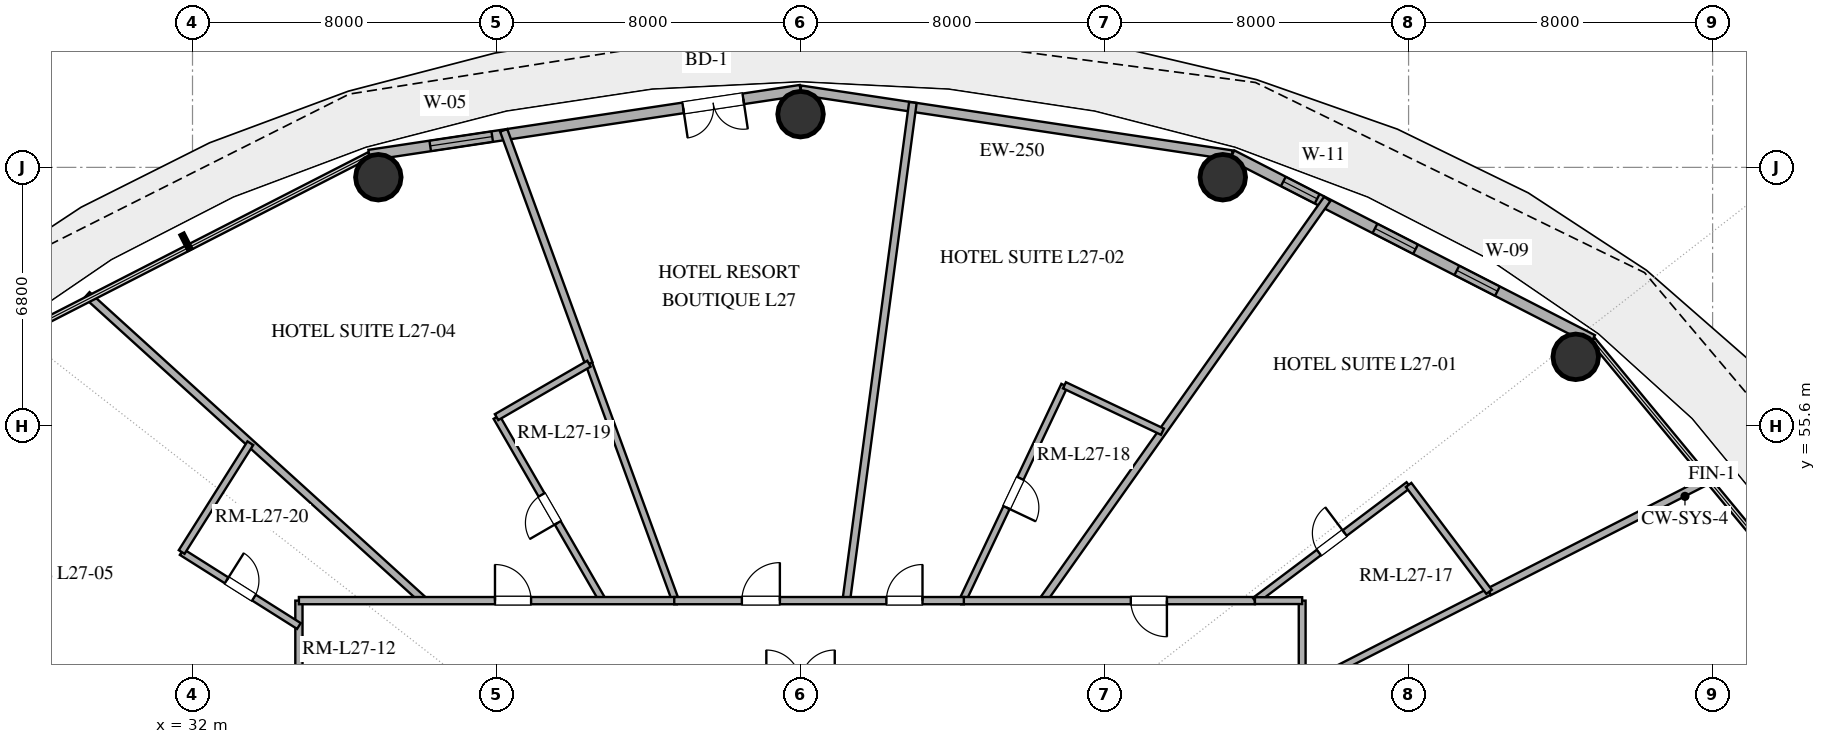
"""IFC4 building model, lengths in metres.
Left out: names, types, materials, properties, quantities, classifications, styles, units other than length and angle.
Written with IfcOpenShell. Run it as: python <this file> out.ifc"""

import sys

from ifc_helpers import new_model, si_unit, direction, frame, frame_2d, origin, origin_2d, place, context, subcontext, project, spatial, rectangle, hollow_circle, extrude, element, fill, save


model = new_model("IFC4")
c1 = context("Model", 3, precision=1e-05, world=origin(), true_north=direction((0.0, 1.0)))
c2 = subcontext(c1, "Body", "Model", "MODEL_VIEW")
j1 = project(units=[si_unit("LENGTHUNIT", "METRE"), si_unit("PLANEANGLEUNIT", "RADIAN")], contexts=[c1])
p1 = place(None, origin())
s1 = spatial("IfcSite", under=j1, at=p1, CompositionType="ELEMENT")
p2 = place(p1, origin())
s2 = spatial("IfcBuilding", under=s1, at=p2, CompositionType="ELEMENT")
p3 = place(p2, frame((0.0, 0.0, 109.2)))
s3 = spatial("IfcBuildingStorey", under=s2, at=p3, CompositionType="ELEMENT", Elevation=109.2)
for number, where, z_axis, x_axis in (
    (1, (68.398, 57.415, 0.0), (0.0, 0.0, 1.0), (1.0, 0.0, 0.0)),
    (2, (59.11, 62.141, 0.0), (0.0, 0.0, 1.0), (1.0, 0.0, 0.0)),
    (3, (48.0, 63.8, 0.0), (0.0, 0.0, 1.0), (1.0, 0.0, 0.0)),
    (4, (36.89, 62.141, 0.0), (0.0, 0.0, 1.0), (1.0, 0.0, 0.0)),
):
    element("IfcColumn", number, at=place(p3, frame(where, z_axis=z_axis, x_axis=x_axis)), inside=s3, PredefinedType="COLUMN", context=c2, shape_type="SweptSolid", body=[
        extrude(hollow_circle(Radius=0.6, WallThickness=0.032, at=origin_2d()), origin(), (0.0, 0.0, 1.0), 3.38),
    ])
p4 = place(p3, frame((68.84, 57.86, 0.0), z_axis=(0.0, 0.0, 1.0), x_axis=(-0.889959505023, 0.45603955905, 0.0)))
e5 = element("IfcWall", 5, at=p4, inside=s3, PredefinedType="SOLIDWALL", context=c2, shape_type="SweptSolid", body=[
    extrude(rectangle(XDim=10.662, YDim=0.28, at=frame_2d((5.331, 0.0))), origin(), (0.0, 0.0, 1.0), 3.38),
])
p5 = place(p4, frame((2.811, 0.0, 0.85)))
e6 = element("IfcOpeningElement", 6, at=p5, cuts=e5, PredefinedType="OPENING", context=c2, shape_type="SweptSolid", body=[
    extrude(rectangle(XDim=1.2, YDim=1.8, at=frame_2d((0.6, 0.9))), frame((0.0, 0.15, 0.0), z_axis=(0.0, -1.0, 0.0), x_axis=(1.0, 0.0, 0.0)), (0.0, 0.0, 1.0), 0.3),
])
p6 = place(p4, frame((5.232, 0.0, 0.85)))
e7 = element("IfcOpeningElement", 7, at=p6, cuts=e5, PredefinedType="OPENING", context=c2, shape_type="SweptSolid", body=[
    extrude(rectangle(XDim=1.2, YDim=1.8, at=frame_2d((0.6, 0.9))), frame((0.0, 0.15, 0.0), z_axis=(0.0, -1.0, 0.0), x_axis=(1.0, 0.0, 0.0)), (0.0, 0.0, 1.0), 0.3),
])
p7 = place(p4, frame((8.142, 0.0, 0.85)))
e8 = element("IfcOpeningElement", 8, at=p7, cuts=e5, PredefinedType="OPENING", context=c2, shape_type="SweptSolid", body=[
    extrude(rectangle(XDim=1.0, YDim=1.8, at=frame_2d((0.5, 0.9))), frame((0.0, 0.15, 0.0), z_axis=(0.0, -1.0, 0.0), x_axis=(1.0, 0.0, 0.0)), (0.0, 0.0, 1.0), 0.3),
])
p8 = place(p3, frame((59.351, 62.723, 0.0), z_axis=(0.0, 0.0, 1.0), x_axis=(-0.988877774656, 0.148730450117, 0.0)))
e9 = element("IfcWall", 9, at=p8, inside=s3, PredefinedType="SOLIDWALL", context=c2, shape_type="SweptSolid", body=[
    extrude(rectangle(XDim=11.479, YDim=0.25, at=frame_2d((5.74, 0.0))), origin(), (0.0, 0.0, 1.0), 3.38),
])
p9 = place(p3, frame((48.0, 64.43, 0.0), z_axis=(0.0, 0.0, 1.0), x_axis=(-0.988877774656, -0.148730450117, 0.0)))
e10 = element("IfcWall", 10, at=p9, inside=s3, PredefinedType="SOLIDWALL", context=c2, shape_type="SweptSolid", body=[
    extrude(rectangle(XDim=11.479, YDim=0.28, at=frame_2d((5.74, 0.0))), origin(), (0.0, 0.0, 1.0), 3.38),
])
p10 = place(p9, frame((1.524, 0.0, 0.0)))
e11 = element("IfcOpeningElement", 11, at=p10, cuts=e10, PredefinedType="OPENING", context=c2, shape_type="SweptSolid", body=[
    extrude(rectangle(XDim=1.6, YDim=2.25, at=frame_2d((0.8, 1.125))), frame((0.0, 0.15, 0.0), z_axis=(0.0, -1.0, 0.0), x_axis=(1.0, 0.0, 0.0)), (0.0, 0.0, 1.0), 0.3),
])
p11 = place(p9, frame((8.205, 0.0, 0.85)))
e12 = element("IfcOpeningElement", 12, at=p11, cuts=e10, PredefinedType="OPENING", context=c2, shape_type="SweptSolid", body=[
    extrude(rectangle(XDim=1.65, YDim=2.0, at=frame_2d((0.825, 1.0))), frame((0.0, 0.15, 0.0), z_axis=(0.0, -1.0, 0.0), x_axis=(1.0, 0.0, 0.0)), (0.0, 0.0, 1.0), 0.3),
])
p12 = place(p3, frame((50.956, 64.107, 0.0), z_axis=(0.0, 0.0, 1.0), x_axis=(-0.132526518831, -0.99117945994, 0.0)))
e13 = element("IfcWall", 13, at=p12, inside=s3, PredefinedType="PARTITIONING", context=c2, shape_type="SweptSolid", body=[
    extrude(rectangle(XDim=13.223, YDim=0.2, at=frame_2d((6.612, 0.0))), origin(), (0.0, 0.0, 1.0), 2.74),
])
p13 = place(p3, frame((54.374, 51.0, 0.0), z_axis=(0.0, 0.0, 1.0), x_axis=(0.577967135411, 0.816060040919, 0.0)))
e14 = element("IfcWall", 14, at=p13, inside=s3, PredefinedType="PARTITIONING", context=c2, shape_type="SweptSolid", body=[
    extrude(rectangle(XDim=12.953, YDim=0.2, at=frame_2d((6.477, 0.0))), origin(), (0.0, 0.0, 1.0), 2.74),
])
p14 = place(p3, frame((42.432, 57.234, 0.0), z_axis=(0.0, 0.0, 1.0), x_axis=(0.343307767445, -0.939222964376, 0.0)))
e15 = element("IfcWall", 15, at=p14, inside=s3, PredefinedType="PLUMBINGWALL", context=c2, shape_type="SweptSolid", body=[
    extrude(rectangle(XDim=6.638, YDim=0.18, at=frame_2d((3.319, 0.0))), origin(), (0.0, 0.0, 1.0), 2.74),
])
p15 = place(p3, frame((71.998, 54.228, 0.0), z_axis=(0.0, 0.0, 1.0), x_axis=(-0.891005333778, -0.453992836044, 0.0)))
e16 = element("IfcWall", 16, at=p15, inside=s3, PredefinedType="PARTITIONING", context=c2, shape_type="SweptSolid", body=[
    extrude(rectangle(XDim=6.599, YDim=0.2, at=frame_2d((3.3, 0.0))), origin(), (0.0, 0.0, 1.0), 2.74),
])
p16 = place(p3, frame((34.8, 36.329, 0.0), z_axis=(0.0, 0.0, 1.0), x_axis=(0.0, 1.0, 0.0)))
e17 = element("IfcWall", 17, at=p16, inside=s3, PredefinedType="PARTITIONING", context=c2, shape_type="SweptSolid", body=[
    extrude(rectangle(XDim=14.671, YDim=0.19, at=frame_2d((7.336, 0.0))), origin(), (0.0, 0.0, 1.0), 2.74),
])
p17 = place(p16, frame((5.341, 0.0, 0.0)))
e18 = element("IfcOpeningElement", 18, at=p17, cuts=e17, PredefinedType="OPENING", context=c2, shape_type="SweptSolid", body=[
    extrude(rectangle(XDim=1.0, YDim=2.2, at=frame_2d((0.5, 1.1))), frame((0.0, 0.105, 0.0), z_axis=(0.0, -1.0, 0.0), x_axis=(1.0, 0.0, 0.0)), (0.0, 0.0, 1.0), 0.21),
])
p18 = place(p16, frame((11.076, 0.0, 0.0)))
e19 = element("IfcOpeningElement", 19, at=p18, cuts=e17, PredefinedType="OPENING", context=c2, shape_type="SweptSolid", body=[
    extrude(rectangle(XDim=0.95, YDim=2.15, at=frame_2d((0.475, 1.075))), frame((0.0, 0.105, 0.0), z_axis=(0.0, -1.0, 0.0), x_axis=(1.0, 0.0, 0.0)), (0.0, 0.0, 1.0), 0.21),
])
p19 = place(p3, frame((40.188, 63.374, 0.0), z_axis=(0.0, 0.0, 1.0), x_axis=(0.343281030887, -0.939232736777, 0.0)))
e20 = element("IfcWall", 20, at=p19, inside=s3, PredefinedType="PARTITIONING", context=c2, shape_type="SweptSolid", body=[
    extrude(rectangle(XDim=6.537, YDim=0.2, at=frame_2d((3.268, 0.0))), origin(), (0.0, 0.0, 1.0), 2.74),
])
p20 = place(p3, frame((54.945, 56.666, 0.0), z_axis=(0.0, 0.0, 1.0), x_axis=(-0.427935680108, -0.903809190975, 0.0)))
e21 = element("IfcWall", 21, at=p20, inside=s3, PredefinedType="PLUMBINGWALL", context=c2, shape_type="SweptSolid", body=[
    extrude(rectangle(XDim=6.269, YDim=0.18, at=frame_2d((3.135, 0.0))), origin(), (0.0, 0.0, 1.0), 2.74),
])
p21 = place(p20, frame((2.71, 0.0, 0.0)))
e22 = element("IfcOpeningElement", 22, at=p21, cuts=e21, PredefinedType="OPENING", context=c2, shape_type="SweptSolid", body=[
    extrude(rectangle(XDim=0.85, YDim=2.1, at=frame_2d((0.425, 1.05))), frame((0.0, 0.1, 0.0), z_axis=(0.0, -1.0, 0.0), x_axis=(1.0, 0.0, 0.0)), (0.0, 0.0, 1.0), 0.2),
])
p22 = place(p3, frame((38.085, 51.0, 0.0), z_axis=(0.0, 0.0, 1.0), x_axis=(-0.74043922717, 0.672123315224, 0.0)))
e23 = element("IfcWall", 23, at=p22, inside=s3, PredefinedType="PARTITIONING", context=c2, shape_type="SweptSolid", body=[
    extrude(rectangle(XDim=11.968, YDim=0.2, at=frame_2d((5.984, 0.0))), origin(), (0.0, 0.0, 1.0), 2.74),
])
p23 = place(p3, frame((59.957, 51.0, 0.0), z_axis=(0.0, 0.0, 1.0), x_axis=(-1.0, 0.0, 0.0)))
e24 = element("IfcWall", 24, at=p23, inside=s3, PredefinedType="PARTITIONING", context=c2, shape_type="SweptSolid", body=[
    extrude(rectangle(XDim=7.73, YDim=0.19, at=frame_2d((3.865, 0.0))), origin(), (0.0, 0.0, 1.0), 2.74),
])
p24 = place(p23, frame((2.316, 0.0, 0.0)))
e25 = element("IfcOpeningElement", 25, at=p24, cuts=e24, PredefinedType="OPENING", context=c2, shape_type="SweptSolid", body=[
    extrude(rectangle(XDim=0.95, YDim=2.15, at=frame_2d((0.475, 1.075))), frame((0.0, 0.105, 0.0), z_axis=(0.0, -1.0, 0.0), x_axis=(1.0, 0.0, 0.0)), (0.0, 0.0, 1.0), 0.21),
])
p25 = place(p3, frame((42.794, 51.0, 0.0), z_axis=(0.0, 0.0, 1.0), x_axis=(-0.500713600684, 0.865613014049, 0.0)))
e26 = element("IfcWall", 26, at=p25, inside=s3, PredefinedType="PLUMBINGWALL", context=c2, shape_type="SweptSolid", body=[
    extrude(rectangle(XDim=5.578, YDim=0.18, at=frame_2d((2.789, 0.0))), origin(), (0.0, 0.0, 1.0), 2.74),
])
p26 = place(p25, frame((2.364, 0.0, 0.0)))
e27 = element("IfcOpeningElement", 27, at=p26, cuts=e26, PredefinedType="OPENING", context=c2, shape_type="SweptSolid", body=[
    extrude(rectangle(XDim=0.85, YDim=2.1, at=frame_2d((0.425, 1.05))), frame((0.0, 0.1, 0.0), z_axis=(0.0, -1.0, 0.0), x_axis=(1.0, 0.0, 0.0)), (0.0, 0.0, 1.0), 0.2),
])
p27 = place(p3, frame((66.118, 51.231, 0.0), z_axis=(0.0, 0.0, 1.0), x_axis=(-0.891004388837, -0.453994690579, 0.0)))
e28 = element("IfcWall", 28, at=p27, inside=s3, PredefinedType="PLUMBINGWALL", context=c2, shape_type="SweptSolid", body=[
    extrude(rectangle(XDim=5.52, YDim=0.18, at=frame_2d((2.76, 0.0))), origin(), (0.0, 0.0, 1.0), 2.74),
])
p28 = place(p3, frame((59.957, 51.0, 0.0), z_axis=(0.0, 0.0, 1.0), x_axis=(0.798951197172, 0.601395863419, 0.0)))
e29 = element("IfcWall", 29, at=p28, inside=s3, PredefinedType="PLUMBINGWALL", context=c2, shape_type="SweptSolid", body=[
    extrude(rectangle(XDim=5.062, YDim=0.18, at=frame_2d((2.531, 0.0))), origin(), (0.0, 0.0, 1.0), 2.74),
])
p29 = place(p28, frame((2.106, 0.0, 0.0)))
e30 = element("IfcOpeningElement", 30, at=p29, cuts=e29, PredefinedType="OPENING", context=c2, shape_type="SweptSolid", body=[
    extrude(rectangle(XDim=0.85, YDim=2.1, at=frame_2d((0.425, 1.05))), frame((0.0, 0.1, 0.0), z_axis=(0.0, -1.0, 0.0), x_axis=(1.0, 0.0, 0.0)), (0.0, 0.0, 1.0), 0.2),
])
p30 = place(p3, frame((34.8, 51.0, 0.0), z_axis=(0.0, 0.0, 1.0), x_axis=(1.0, 0.0, 0.0)))
e31 = element("IfcWall", 31, at=p30, inside=s3, PredefinedType="PARTITIONING", context=c2, shape_type="SweptSolid", body=[
    extrude(rectangle(XDim=9.945, YDim=0.19, at=frame_2d((4.972, 0.0))), origin(), (0.0, 0.0, 1.0), 2.74),
])
p31 = place(p30, frame((5.159, 0.0, 0.0)))
e32 = element("IfcOpeningElement", 32, at=p31, cuts=e31, PredefinedType="OPENING", context=c2, shape_type="SweptSolid", body=[
    extrude(rectangle(XDim=0.95, YDim=2.15, at=frame_2d((0.475, 1.075))), frame((0.0, 0.105, 0.0), z_axis=(0.0, -1.0, 0.0), x_axis=(1.0, 0.0, 0.0)), (0.0, 0.0, 1.0), 0.21),
])
p32 = place(p3, frame((44.677, 51.0, 0.0), z_axis=(0.0, 0.0, 1.0), x_axis=(1.0, 0.0, 0.0)))
e33 = element("IfcWall", 33, at=p32, inside=s3, PredefinedType="PARTITIONING", context=c2, shape_type="SweptSolid", body=[
    extrude(rectangle(XDim=7.621, YDim=0.19, at=frame_2d((3.81, 0.0))), origin(), (0.0, 0.0, 1.0), 2.74),
])
p33 = place(p32, frame((1.78, 0.0, 0.0)))
e34 = element("IfcOpeningElement", 34, at=p33, cuts=e33, PredefinedType="OPENING", context=c2, shape_type="SweptSolid", body=[
    extrude(rectangle(XDim=1.0, YDim=2.2, at=frame_2d((0.5, 1.1))), frame((0.0, 0.105, 0.0), z_axis=(0.0, -1.0, 0.0), x_axis=(1.0, 0.0, 0.0)), (0.0, 0.0, 1.0), 0.21),
])
p34 = place(p32, frame((5.583, 0.0, 0.0)))
e35 = element("IfcOpeningElement", 35, at=p34, cuts=e33, PredefinedType="OPENING", context=c2, shape_type="SweptSolid", body=[
    extrude(rectangle(XDim=0.95, YDim=2.15, at=frame_2d((0.475, 1.075))), frame((0.0, 0.105, 0.0), z_axis=(0.0, -1.0, 0.0), x_axis=(1.0, 0.0, 0.0)), (0.0, 0.0, 1.0), 0.21),
])
p35 = place(p3, frame((31.715, 52.28, 0.0), z_axis=(0.0, 0.0, 1.0), x_axis=(0.845617675202, -0.533789047645, 0.0)))
e36 = element("IfcWall", 36, at=p35, inside=s3, PredefinedType="PLUMBINGWALL", context=c2, shape_type="SweptSolid", body=[
    extrude(rectangle(XDim=3.648, YDim=0.18, at=frame_2d((1.824, 0.0))), origin(), (0.0, 0.0, 1.0), 2.74),
])
p36 = place(p35, frame((1.399, 0.0, 0.0)))
e37 = element("IfcOpeningElement", 37, at=p36, cuts=e36, PredefinedType="OPENING", context=c2, shape_type="SweptSolid", body=[
    extrude(rectangle(XDim=0.85, YDim=2.1, at=frame_2d((0.425, 1.05))), frame((0.0, 0.1, 0.0), z_axis=(0.0, -1.0, 0.0), x_axis=(1.0, 0.0, 0.0)), (0.0, 0.0, 1.0), 0.2),
])
p37 = place(p3, frame((64.001, 54.044, 0.0), z_axis=(0.0, 0.0, 1.0), x_axis=(0.601341788725, -0.79899189804, 0.0)))
e38 = element("IfcWall", 38, at=p37, inside=s3, PredefinedType="PLUMBINGWALL", context=c2, shape_type="SweptSolid", body=[
    extrude(rectangle(XDim=3.52, YDim=0.18, at=frame_2d((1.76, 0.0))), origin(), (0.0, 0.0, 1.0), 2.74),
])
p38 = place(p3, frame((33.522, 55.142, 0.0), z_axis=(0.0, 0.0, 1.0), x_axis=(-0.533805735916, -0.845607140641, 0.0)))
e39 = element("IfcWall", 39, at=p38, inside=s3, PredefinedType="PLUMBINGWALL", context=c2, shape_type="SweptSolid", body=[
    extrude(rectangle(XDim=3.385, YDim=0.18, at=frame_2d((1.692, 0.0))), origin(), (0.0, 0.0, 1.0), 2.74),
])
p39 = place(p3, frame((57.523, 55.446, 0.0), z_axis=(0.0, 0.0, 1.0), x_axis=(-0.90380753646, 0.42793917446, 0.0)))
e40 = element("IfcWall", 40, at=p39, inside=s3, PredefinedType="PLUMBINGWALL", context=c2, shape_type="SweptSolid", body=[
    extrude(rectangle(XDim=2.853, YDim=0.18, at=frame_2d((1.426, 0.0))), origin(), (0.0, 0.0, 1.0), 2.74),
])
p40 = place(p3, frame((40.001, 55.828, 0.0), z_axis=(0.0, 0.0, 1.0), x_axis=(0.865614723212, 0.50071064594, 0.0)))
e41 = element("IfcWall", 41, at=p40, inside=s3, PredefinedType="PLUMBINGWALL", context=c2, shape_type="SweptSolid", body=[
    extrude(rectangle(XDim=2.808, YDim=0.18, at=frame_2d((1.404, 0.0))), origin(), (0.0, 0.0, 1.0), 2.74),
])
p41 = place(p3, frame((61.2, 48.726, 0.0), z_axis=(0.0, 0.0, 1.0), x_axis=(0.0, 1.0, 0.0)))
e42 = element("IfcWall", 42, at=p41, inside=s3, PredefinedType="PLUMBINGWALL", context=c2, shape_type="SweptSolid", body=[
    extrude(rectangle(XDim=2.274, YDim=0.18, at=frame_2d((1.137, 0.0))), origin(), (0.0, 0.0, 1.0), 2.74),
])
p42 = place(p3, frame((61.2, 51.0, 0.0), z_axis=(0.0, 0.0, 1.0), x_axis=(-1.0, 0.0, 0.0)))
e43 = element("IfcWall", 43, at=p42, inside=s3, PredefinedType="PLUMBINGWALL", context=c2, shape_type="SweptSolid", body=[
    extrude(rectangle(XDim=1.243, YDim=0.18, at=frame_2d((0.622, 0.0))), origin(), (0.0, 0.0, 1.0), 2.74),
])
p43 = place(p5, origin())
e44 = element("IfcWindow", 44, at=p43, inside=s3, PartitioningType="SINGLE_PANEL", PredefinedType="WINDOW", context=c2, shape_type="SweptSolid", body=[
    extrude(rectangle(XDim=1.2, YDim=1.8, at=frame_2d((0.6, 0.9))), frame((0.0, 0.03, 0.0), z_axis=(0.0, -1.0, 0.0), x_axis=(1.0, 0.0, 0.0)), (0.0, 0.0, 1.0), 0.06),
])
fill(e6, e44)
p44 = place(p6, origin())
e45 = element("IfcWindow", 45, at=p44, inside=s3, PartitioningType="SINGLE_PANEL", PredefinedType="WINDOW", context=c2, shape_type="SweptSolid", body=[
    extrude(rectangle(XDim=1.2, YDim=1.8, at=frame_2d((0.6, 0.9))), frame((0.0, 0.03, 0.0), z_axis=(0.0, -1.0, 0.0), x_axis=(1.0, 0.0, 0.0)), (0.0, 0.0, 1.0), 0.06),
])
fill(e7, e45)
p45 = place(p10, origin())
e46 = element("IfcDoor", 46, at=p45, inside=s3, OperationType="DOUBLE_DOOR_SINGLE_SWING", PredefinedType="DOOR", context=c2, shape_type="SweptSolid", body=[
    extrude(rectangle(XDim=1.6, YDim=2.25, at=frame_2d((0.8, 1.125))), frame((0.0, 0.025, 0.0), z_axis=(0.0, -1.0, 0.0), x_axis=(1.0, 0.0, 0.0)), (0.0, 0.0, 1.0), 0.05),
])
fill(e11, e46)
p46 = place(p11, origin())
e47 = element("IfcWindow", 47, at=p46, inside=s3, PartitioningType="SINGLE_PANEL", PredefinedType="WINDOW", context=c2, shape_type="SweptSolid", body=[
    extrude(rectangle(XDim=1.65, YDim=2.0, at=frame_2d((0.825, 1.0))), frame((0.0, 0.03, 0.0), z_axis=(0.0, -1.0, 0.0), x_axis=(1.0, 0.0, 0.0)), (0.0, 0.0, 1.0), 0.06),
])
fill(e12, e47)
p47 = place(p7, origin())
e48 = element("IfcWindow", 48, at=p47, inside=s3, PartitioningType="SINGLE_PANEL", PredefinedType="WINDOW", context=c2, shape_type="SweptSolid", body=[
    extrude(rectangle(XDim=1.0, YDim=1.8, at=frame_2d((0.5, 0.9))), frame((0.0, 0.03, 0.0), z_axis=(0.0, -1.0, 0.0), x_axis=(1.0, 0.0, 0.0)), (0.0, 0.0, 1.0), 0.06),
])
fill(e8, e48)
p48 = place(p21, origin())
e49 = element("IfcDoor", 49, at=p48, inside=s3, OperationType="SINGLE_SWING_RIGHT", PredefinedType="DOOR", context=c2, shape_type="SweptSolid", body=[
    extrude(rectangle(XDim=0.85, YDim=2.1, at=frame_2d((0.425, 1.05))), frame((0.0, 0.025, 0.0), z_axis=(0.0, -1.0, 0.0), x_axis=(1.0, 0.0, 0.0)), (0.0, 0.0, 1.0), 0.05),
])
fill(e22, e49)
p49 = place(p24, origin())
e50 = element("IfcDoor", 50, at=p49, inside=s3, OperationType="SINGLE_SWING_LEFT", PredefinedType="DOOR", context=c2, shape_type="SweptSolid", body=[
    extrude(rectangle(XDim=0.95, YDim=2.15, at=frame_2d((0.475, 1.075))), frame((0.0, 0.025, 0.0), z_axis=(0.0, -1.0, 0.0), x_axis=(1.0, 0.0, 0.0)), (0.0, 0.0, 1.0), 0.05),
])
fill(e25, e50)
p50 = place(p26, origin())
e51 = element("IfcDoor", 51, at=p50, inside=s3, OperationType="SINGLE_SWING_LEFT", PredefinedType="DOOR", context=c2, shape_type="SweptSolid", body=[
    extrude(rectangle(XDim=0.85, YDim=2.1, at=frame_2d((0.425, 1.05))), frame((0.0, 0.025, 0.0), z_axis=(0.0, -1.0, 0.0), x_axis=(1.0, 0.0, 0.0)), (0.0, 0.0, 1.0), 0.05),
])
fill(e27, e51)
p51 = place(p29, origin())
e52 = element("IfcDoor", 52, at=p51, inside=s3, OperationType="SINGLE_SWING_RIGHT", PredefinedType="DOOR", context=c2, shape_type="SweptSolid", body=[
    extrude(rectangle(XDim=0.85, YDim=2.1, at=frame_2d((0.425, 1.05))), frame((0.0, 0.025, 0.0), z_axis=(0.0, -1.0, 0.0), x_axis=(1.0, 0.0, 0.0)), (0.0, 0.0, 1.0), 0.05),
])
fill(e30, e52)
p52 = place(p31, origin())
e53 = element("IfcDoor", 53, at=p52, inside=s3, OperationType="SINGLE_SWING_LEFT", PredefinedType="DOOR", context=c2, shape_type="SweptSolid", body=[
    extrude(rectangle(XDim=0.95, YDim=2.15, at=frame_2d((0.475, 1.075))), frame((0.0, 0.025, 0.0), z_axis=(0.0, -1.0, 0.0), x_axis=(1.0, 0.0, 0.0)), (0.0, 0.0, 1.0), 0.05),
])
fill(e32, e53)
p53 = place(p33, origin())
e54 = element("IfcDoor", 54, at=p53, inside=s3, OperationType="SINGLE_SWING_RIGHT", PredefinedType="DOOR", context=c2, shape_type="SweptSolid", body=[
    extrude(rectangle(XDim=1.0, YDim=2.2, at=frame_2d((0.5, 1.1))), frame((0.0, 0.025, 0.0), z_axis=(0.0, -1.0, 0.0), x_axis=(1.0, 0.0, 0.0)), (0.0, 0.0, 1.0), 0.05),
])
fill(e34, e54)
p54 = place(p34, origin())
e55 = element("IfcDoor", 55, at=p54, inside=s3, OperationType="SINGLE_SWING_RIGHT", PredefinedType="DOOR", context=c2, shape_type="SweptSolid", body=[
    extrude(rectangle(XDim=0.95, YDim=2.15, at=frame_2d((0.475, 1.075))), frame((0.0, 0.025, 0.0), z_axis=(0.0, -1.0, 0.0), x_axis=(1.0, 0.0, 0.0)), (0.0, 0.0, 1.0), 0.05),
])
fill(e35, e55)
p55 = place(p36, origin())
e56 = element("IfcDoor", 56, at=p55, inside=s3, OperationType="SINGLE_SWING_LEFT", PredefinedType="DOOR", context=c2, shape_type="SweptSolid", body=[
    extrude(rectangle(XDim=0.85, YDim=2.1, at=frame_2d((0.425, 1.05))), frame((0.0, 0.025, 0.0), z_axis=(0.0, -1.0, 0.0), x_axis=(1.0, 0.0, 0.0)), (0.0, 0.0, 1.0), 0.05),
])
fill(e37, e56)
save(model, sys.argv[1])
